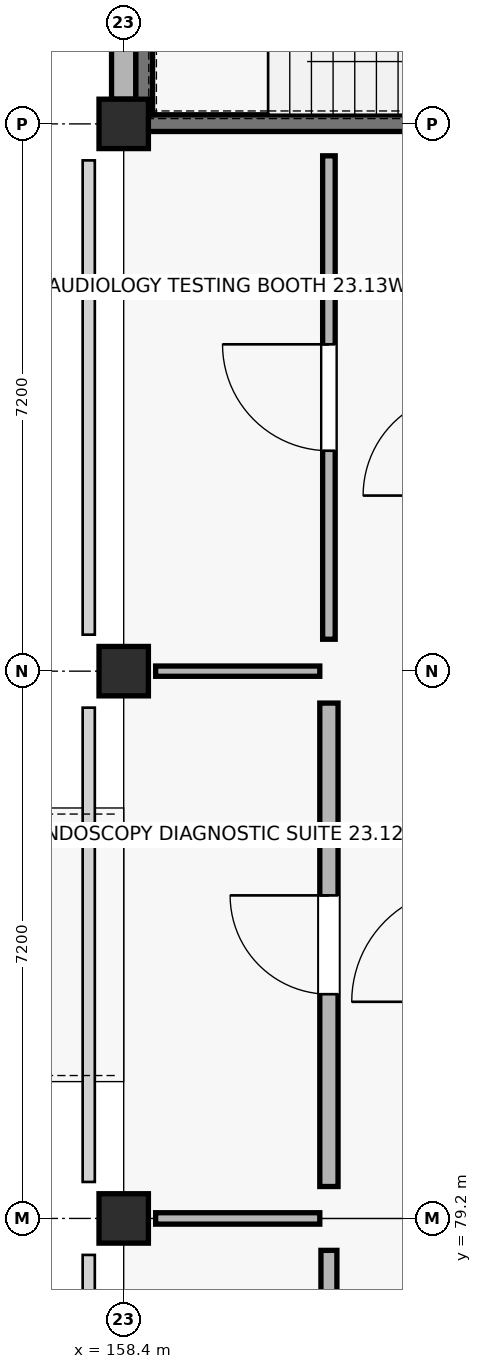
"""IFC4 building model, lengths in metres.
Left out: names, types, materials, properties, quantities, classifications, styles, units other than length and angle.
Written with IfcOpenShell. Run it as: python <this file> out.ifc"""

import sys

from ifc_helpers import new_model, si_unit, direction, frame, frame_2d, origin, origin_2d, place, context, subcontext, project, spatial, rectangle, extrude, element, fill, save


model = new_model("IFC4")
c1 = context("Model", 3, precision=1e-05, world=origin(), true_north=direction((0.0, 1.0)))
c2 = subcontext(c1, "Body", "Model", "MODEL_VIEW")
j1 = project(units=[si_unit("LENGTHUNIT", "METRE"), si_unit("PLANEANGLEUNIT", "RADIAN")], contexts=[c1])
p1 = place(None, origin())
s1 = spatial("IfcSite", under=j1, at=p1, CompositionType="ELEMENT")
p2 = place(p1, origin())
s2 = spatial("IfcBuilding", under=s1, at=p2, CompositionType="ELEMENT")
p3 = place(p2, frame((0.0, 0.0, 4.5)))
s3 = spatial("IfcBuildingStorey", under=s2, at=p3, CompositionType="ELEMENT", Elevation=4.5)
for number, where, z_axis, x_axis in (
    (1, (158.4, 79.2, 0.0), (0.0, 0.0, 1.0), (1.0, 0.0, 0.0)),
    (2, (158.4, 86.4, 0.0), (0.0, 0.0, 1.0), (1.0, 0.0, 0.0)),
    (3, (158.4, 93.6, 0.0), (0.0, 0.0, 1.0), (1.0, 0.0, 0.0)),
):
    element("IfcColumn", number, at=place(p3, frame(where, z_axis=z_axis, x_axis=x_axis)), inside=s3, PredefinedType="COLUMN", context=c2, shape_type="SweptSolid", body=[
        extrude(rectangle(XDim=0.65, YDim=0.65, at=origin_2d()), origin(), (0.0, 0.0, 1.0), 4.5),
    ])
p4 = place(p3, frame((158.4, 100.475, 0.0), z_axis=(0.0, 0.0, 1.0), x_axis=(0.0, -1.0, 0.0)))
e4 = element("IfcWall", 4, at=p4, inside=s3, PredefinedType="STANDARD", context=c2, shape_type="SweptSolid", body=[
    extrude(rectangle(XDim=6.55, YDim=0.32, at=frame_2d((3.275, 0.0))), origin(), (0.0, 0.0, 1.0), 3.52),
])
p5 = place(p3, frame((158.56, 93.61, 0.0), z_axis=(0.0, 0.0, 1.0), x_axis=(1.0, 0.0, 0.0)))
e5 = element("IfcWall", 5, at=p5, inside=s3, PredefinedType="SHEAR", context=c2, shape_type="SweptSolid", body=[
    extrude(rectangle(XDim=6.88, YDim=0.22, at=frame_2d((3.44, 0.0))), origin(), (0.0, 0.0, 1.0), 4.22),
])
p6 = place(p5, frame((5.3, 0.0, 0.0)))
e6 = element("IfcOpeningElement", 6, at=p6, cuts=e5, PredefinedType="OPENING", context=c2, shape_type="SweptSolid", body=[
    extrude(rectangle(XDim=1.15, YDim=2.15, at=frame_2d((0.575, 1.075))), frame((0.0, 0.12, 0.0), z_axis=(0.0, -1.0, 0.0), x_axis=(1.0, 0.0, 0.0)), (0.0, 0.0, 1.0), 0.24),
])
p7 = place(p3, frame((158.67, 93.72, 0.0), z_axis=(0.0, 0.0, 1.0), x_axis=(0.0, 1.0, 0.0)))
e7 = element("IfcWall", 7, at=p7, inside=s3, PredefinedType="SHEAR", context=c2, shape_type="SweptSolid", body=[
    extrude(rectangle(XDim=3.0, YDim=0.22, at=frame_2d((1.5, 0.0))), origin(), (0.0, 0.0, 1.0), 4.22),
])
p8 = place(p3, frame((161.1, 72.42, 0.0), z_axis=(0.0, 0.0, 1.0), x_axis=(0.0, 1.0, 0.0)))
e8 = element("IfcWall", 8, at=p8, inside=s3, PredefinedType="PLUMBINGWALL", context=c2, shape_type="SweptSolid", body=[
    extrude(rectangle(XDim=6.36, YDim=0.21, at=frame_2d((3.18, 0.0))), origin(), (0.0, 0.0, 1.0), 3.36),
])
p9 = place(p8, frame((2.45, 0.0, 0.0)))
e9 = element("IfcOpeningElement", 9, at=p9, cuts=e8, PredefinedType="OPENING", context=c2, shape_type="SweptSolid", body=[
    extrude(rectangle(XDim=1.46, YDim=2.19, at=frame_2d((0.73, 1.095))), frame((0.0, 0.115, 0.0), z_axis=(0.0, -1.0, 0.0), x_axis=(1.0, 0.0, 0.0)), (0.0, 0.0, 1.0), 0.23),
])
p10 = place(p3, frame((158.82, 79.2, 0.0), z_axis=(0.0, 0.0, 1.0), x_axis=(1.0, 0.0, 0.0)))
e10 = element("IfcWall", 10, at=p10, inside=s3, PredefinedType="PARTITIONING", context=c2, shape_type="SweptSolid", body=[
    extrude(rectangle(XDim=2.16, YDim=0.15, at=frame_2d((1.08, 0.0))), origin(), (0.0, 0.0, 1.0), 3.36),
])
p11 = place(p3, frame((161.1, 79.62, 0.0), z_axis=(0.0, 0.0, 1.0), x_axis=(0.0, 1.0, 0.0)))
e11 = element("IfcWall", 11, at=p11, inside=s3, PredefinedType="SOLIDWALL", context=c2, shape_type="SweptSolid", body=[
    extrude(rectangle(XDim=6.36, YDim=0.24, at=frame_2d((3.18, 0.0))), origin(), (0.0, 0.0, 1.0), 3.36),
])
p12 = place(p11, frame((2.53, 0.0, 0.0)))
e12 = element("IfcOpeningElement", 12, at=p12, cuts=e11, PredefinedType="OPENING", context=c2, shape_type="SweptSolid", body=[
    extrude(rectangle(XDim=1.3, YDim=2.15, at=frame_2d((0.65, 1.075))), frame((0.0, 0.13, 0.0), z_axis=(0.0, -1.0, 0.0), x_axis=(1.0, 0.0, 0.0)), (0.0, 0.0, 1.0), 0.26),
])
p13 = place(p3, frame((158.82, 86.4, 0.0), z_axis=(0.0, 0.0, 1.0), x_axis=(1.0, 0.0, 0.0)))
e13 = element("IfcWall", 13, at=p13, inside=s3, PredefinedType="PARTITIONING", context=c2, shape_type="SweptSolid", body=[
    extrude(rectangle(XDim=2.16, YDim=0.135, at=frame_2d((1.08, 0.0))), origin(), (0.0, 0.0, 1.0), 3.36),
])
p14 = place(p3, frame((161.1, 86.82, 0.0), z_axis=(0.0, 0.0, 1.0), x_axis=(0.0, 1.0, 0.0)))
e14 = element("IfcWall", 14, at=p14, inside=s3, PredefinedType="PARTITIONING", context=c2, shape_type="SweptSolid", body=[
    extrude(rectangle(XDim=6.36, YDim=0.165, at=frame_2d((3.18, 0.0))), origin(), (0.0, 0.0, 1.0), 3.36),
])
p15 = place(p14, frame((2.48, 0.0, 0.0)))
e15 = element("IfcOpeningElement", 15, at=p15, cuts=e14, PredefinedType="OPENING", context=c2, shape_type="SweptSolid", body=[
    extrude(rectangle(XDim=1.4, YDim=2.2, at=frame_2d((0.7, 1.1))), frame((0.0, 0.093, 0.0), z_axis=(0.0, -1.0, 0.0), x_axis=(1.0, 0.0, 0.0)), (0.0, 0.0, 1.0), 0.185),
])
p16 = place(p12, origin())
e16 = element("IfcDoor", 16, at=p16, inside=s3, OperationType="SINGLE_SWING_RIGHT", PredefinedType="DOOR", context=c2, shape_type="SweptSolid", body=[
    extrude(rectangle(XDim=1.3, YDim=2.15, at=frame_2d((0.65, 1.075))), frame((0.0, 0.025, 0.0), z_axis=(0.0, -1.0, 0.0), x_axis=(1.0, 0.0, 0.0)), (0.0, 0.0, 1.0), 0.05),
])
fill(e12, e16)
p17 = place(p15, origin())
e17 = element("IfcDoor", 17, at=p17, inside=s3, OperationType="SINGLE_SWING_RIGHT", PredefinedType="DOOR", context=c2, shape_type="SweptSolid", body=[
    extrude(rectangle(XDim=1.4, YDim=2.2, at=frame_2d((0.7, 1.1))), frame((0.0, 0.025, 0.0), z_axis=(0.0, -1.0, 0.0), x_axis=(1.0, 0.0, 0.0)), (0.0, 0.0, 1.0), 0.05),
])
fill(e15, e17)
save(model, sys.argv[1])
